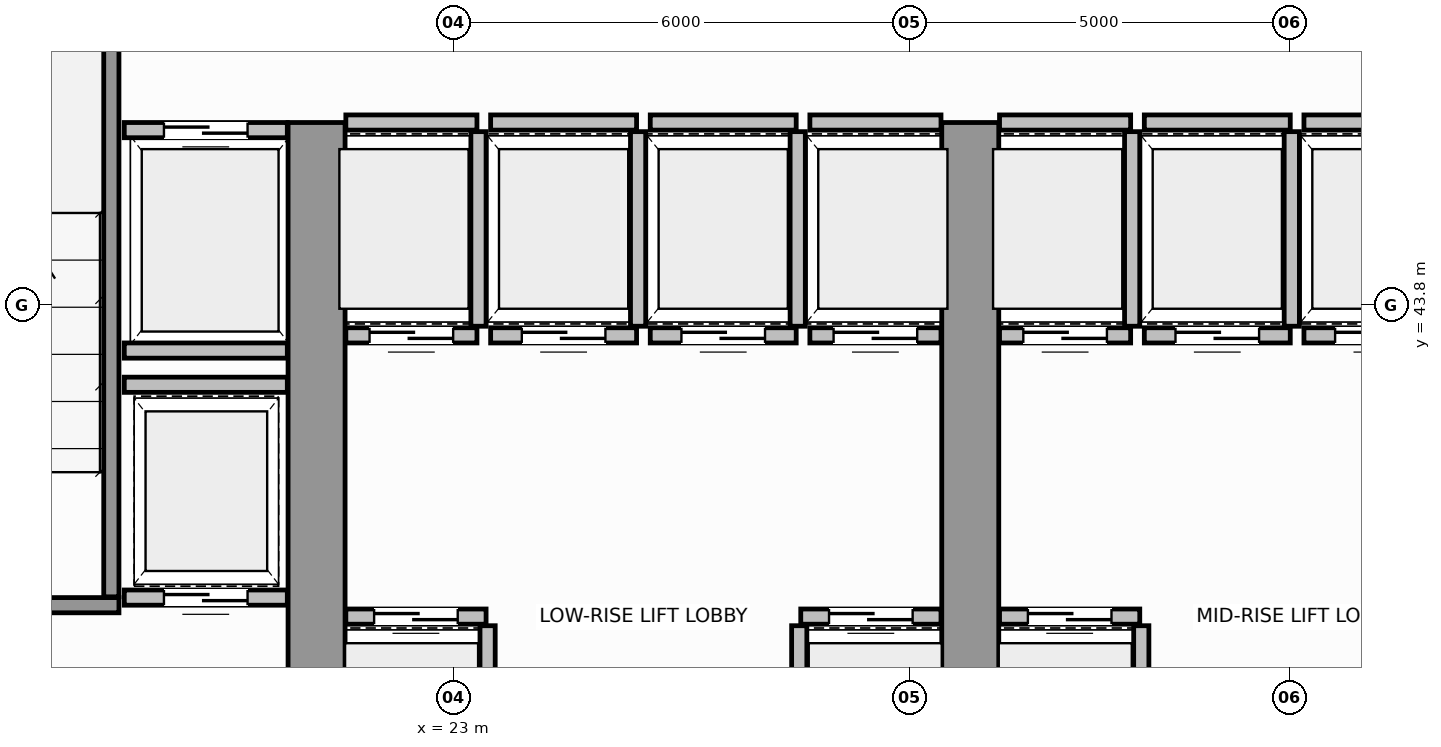
"""IFC4 building model, lengths in metres.
Left out: names, types, materials, properties, quantities, classifications, styles, units other than length and angle.
Written with IfcOpenShell. Run it as: python <this file> out.ifc"""

import sys

from ifc_helpers import new_model, si_unit, direction, frame, frame_2d, origin, place, context, subcontext, project, spatial, rectangle, extrude, source, transform, mapped, element, fill, save


model = new_model("IFC4")
c1 = context("Model", 3, precision=1e-05, world=origin(), true_north=direction((0.0, 1.0)))
c2 = subcontext(c1, "Body", "Model", "MODEL_VIEW")
j1 = project(units=[si_unit("LENGTHUNIT", "METRE"), si_unit("PLANEANGLEUNIT", "RADIAN")], contexts=[c1])
p1 = place(None, origin())
s1 = spatial("IfcSite", under=j1, at=p1, CompositionType="ELEMENT")
p2 = place(p1, origin())
s2 = spatial("IfcBuilding", under=s1, at=p2, CompositionType="ELEMENT")
p3 = place(p2, frame((0.0, 0.0, 99.6)))
s3 = spatial("IfcBuildingStorey", under=s2, at=p3, CompositionType="ELEMENT", Elevation=99.6)
for number, where, z_axis, x_axis in (
    (1, (21.2, 36.895, 0.0), (0.0, 0.0, 1.0), (0.0, 1.0, 0.0)),
    (2, (29.8, 36.895, 0.0), (0.0, 0.0, 1.0), (0.0, 1.0, 0.0)),
):
    element("IfcWall", number, at=place(p3, frame(where, z_axis=z_axis, x_axis=x_axis)), inside=s3, PredefinedType="SHEAR", context=c2, shape_type="SweptSolid", body=[
        extrude(rectangle(XDim=9.305, YDim=0.75, at=frame_2d((4.652, 0.0))), origin(), (0.0, 0.0, 1.0), 3.8),
    ])
p4 = place(p3, frame((14.375, 39.85, 0.0), z_axis=(0.0, 0.0, 1.0), x_axis=(1.0, 0.0, 0.0)))
e3 = element("IfcWall", 3, at=p4, inside=s3, PredefinedType="SOLIDWALL", context=c2, shape_type="SweptSolid", body=[
    extrude(rectangle(XDim=4.225, YDim=0.2, at=frame_2d((2.113, 0.0))), origin(), (0.0, 0.0, 1.0), 3.8),
])
p5 = place(p4, frame((1.8, 0.0, 0.0)))
e4 = element("IfcOpeningElement", 4, at=p5, cuts=e3, PredefinedType="OPENING", context=c2, shape_type="SweptSolid", body=[
    extrude(rectangle(XDim=1.1, YDim=2.15, at=frame_2d((0.55, 1.075))), frame((0.0, 0.11, 0.0), z_axis=(0.0, -1.0, 0.0), x_axis=(1.0, 0.0, 0.0)), (0.0, 0.0, 1.0), 0.22),
])
p6 = place(p3, frame((18.5, 39.96, 0.0), z_axis=(0.0, 0.0, 1.0), x_axis=(0.0, 1.0, 0.0)))
e5 = element("IfcWall", 5, at=p6, inside=s3, PredefinedType="SOLIDWALL", context=c2, shape_type="SweptSolid", body=[
    extrude(rectangle(XDim=9.93, YDim=0.2, at=frame_2d((4.965, 0.0))), origin(), (0.0, 0.0, 1.0), 3.8),
])
p7 = place(p3, frame((21.585, 39.7, 0.0), z_axis=(0.0, 0.0, 1.0), x_axis=(1.0, 0.0, 0.0)))
e6 = element("IfcWall", 6, at=p7, inside=s3, PredefinedType="SOLIDWALL", context=c2, shape_type="SweptSolid", body=[
    extrude(rectangle(XDim=1.845, YDim=0.2, at=frame_2d((0.922, 0.0))), origin(), (0.0, 0.0, 1.0), 3.58),
])
p8 = place(p7, frame((0.372, 0.0, 0.0)))
e7 = element("IfcOpeningElement", 7, at=p8, cuts=e6, PredefinedType="OPENING", context=c2, shape_type="SweptSolid", body=[
    extrude(rectangle(XDim=1.1, YDim=2.15, at=frame_2d((0.55, 1.075))), frame((0.0, 0.11, 0.0), z_axis=(0.0, -1.0, 0.0), x_axis=(1.0, 0.0, 0.0)), (0.0, 0.0, 1.0), 0.22),
])
p9 = place(p3, frame((23.45, 37.02, 0.0), z_axis=(0.0, 0.0, 1.0), x_axis=(0.0, 1.0, 0.0)))
e8 = element("IfcWall", 8, at=p9, inside=s3, PredefinedType="SOLIDWALL", context=c2, shape_type="SweptSolid", body=[
    extrude(rectangle(XDim=2.56, YDim=0.2, at=frame_2d((1.28, 0.0))), origin(), (0.0, 0.0, 1.0), 3.58),
])
p10 = place(p3, frame((27.57, 39.7, 0.0), z_axis=(0.0, 0.0, 1.0), x_axis=(1.0, 0.0, 0.0)))
e9 = element("IfcWall", 9, at=p10, inside=s3, PredefinedType="SOLIDWALL", context=c2, shape_type="SweptSolid", body=[
    extrude(rectangle(XDim=1.845, YDim=0.2, at=frame_2d((0.922, 0.0))), origin(), (0.0, 0.0, 1.0), 3.58),
])
p11 = place(p10, frame((0.372, 0.0, 0.0)))
e10 = element("IfcOpeningElement", 10, at=p11, cuts=e9, PredefinedType="OPENING", context=c2, shape_type="SweptSolid", body=[
    extrude(rectangle(XDim=1.1, YDim=2.15, at=frame_2d((0.55, 1.075))), frame((0.0, 0.11, 0.0), z_axis=(0.0, -1.0, 0.0), x_axis=(1.0, 0.0, 0.0)), (0.0, 0.0, 1.0), 0.22),
])
p12 = place(p3, frame((27.55, 37.02, 0.0), z_axis=(0.0, 0.0, 1.0), x_axis=(0.0, 1.0, 0.0)))
e11 = element("IfcWall", 11, at=p12, inside=s3, PredefinedType="SOLIDWALL", context=c2, shape_type="SweptSolid", body=[
    extrude(rectangle(XDim=2.56, YDim=0.2, at=frame_2d((1.28, 0.0))), origin(), (0.0, 0.0, 1.0), 3.58),
])
p13 = place(p3, frame((21.585, 43.4, 0.0), z_axis=(0.0, 0.0, 1.0), x_axis=(1.0, 0.0, 0.0)))
e12 = element("IfcWall", 12, at=p13, inside=s3, PredefinedType="SOLIDWALL", context=c2, shape_type="SweptSolid", body=[
    extrude(rectangle(XDim=1.725, YDim=0.2, at=frame_2d((0.863, 0.0))), origin(), (0.0, 0.0, 1.0), 3.58),
])
p14 = place(p13, frame((0.312, 0.0, 0.0)))
e13 = element("IfcOpeningElement", 13, at=p14, cuts=e12, PredefinedType="OPENING", context=c2, shape_type="SweptSolid", body=[
    extrude(rectangle(XDim=1.1, YDim=2.15, at=frame_2d((0.55, 1.075))), frame((0.0, 0.11, 0.0), z_axis=(0.0, -1.0, 0.0), x_axis=(1.0, 0.0, 0.0)), (0.0, 0.0, 1.0), 0.22),
])
p15 = place(p3, frame((21.585, 46.2, 0.0), z_axis=(0.0, 0.0, 1.0), x_axis=(1.0, 0.0, 0.0)))
e14 = element("IfcWall", 14, at=p15, inside=s3, PredefinedType="SOLIDWALL", context=c2, shape_type="SweptSolid", body=[
    extrude(rectangle(XDim=1.725, YDim=0.2, at=frame_2d((0.863, 0.0))), origin(), (0.0, 0.0, 1.0), 3.58),
])
p16 = place(p3, frame((23.33, 43.52, 0.0), z_axis=(0.0, 0.0, 1.0), x_axis=(0.0, 1.0, 0.0)))
e15 = element("IfcWall", 15, at=p16, inside=s3, PredefinedType="SOLIDWALL", context=c2, shape_type="SweptSolid", body=[
    extrude(rectangle(XDim=2.56, YDim=0.2, at=frame_2d((1.28, 0.0))), origin(), (0.0, 0.0, 1.0), 3.58),
])
p17 = place(p3, frame((23.49, 43.4, 0.0), z_axis=(0.0, 0.0, 1.0), x_axis=(1.0, 0.0, 0.0)))
e16 = element("IfcWall", 16, at=p17, inside=s3, PredefinedType="SOLIDWALL", context=c2, shape_type="SweptSolid", body=[
    extrude(rectangle(XDim=1.92, YDim=0.2, at=frame_2d((0.96, 0.0))), origin(), (0.0, 0.0, 1.0), 3.58),
])
p18 = place(p17, frame((0.41, 0.0, 0.0)))
e17 = element("IfcOpeningElement", 17, at=p18, cuts=e16, PredefinedType="OPENING", context=c2, shape_type="SweptSolid", body=[
    extrude(rectangle(XDim=1.1, YDim=2.15, at=frame_2d((0.55, 1.075))), frame((0.0, 0.11, 0.0), z_axis=(0.0, -1.0, 0.0), x_axis=(1.0, 0.0, 0.0)), (0.0, 0.0, 1.0), 0.22),
])
p19 = place(p3, frame((23.49, 46.2, 0.0), z_axis=(0.0, 0.0, 1.0), x_axis=(1.0, 0.0, 0.0)))
e18 = element("IfcWall", 18, at=p19, inside=s3, PredefinedType="SOLIDWALL", context=c2, shape_type="SweptSolid", body=[
    extrude(rectangle(XDim=1.92, YDim=0.2, at=frame_2d((0.96, 0.0))), origin(), (0.0, 0.0, 1.0), 3.58),
])
p20 = place(p3, frame((25.43, 43.52, 0.0), z_axis=(0.0, 0.0, 1.0), x_axis=(0.0, 1.0, 0.0)))
e19 = element("IfcWall", 19, at=p20, inside=s3, PredefinedType="SOLIDWALL", context=c2, shape_type="SweptSolid", body=[
    extrude(rectangle(XDim=2.56, YDim=0.2, at=frame_2d((1.28, 0.0))), origin(), (0.0, 0.0, 1.0), 3.58),
])
p21 = place(p3, frame((25.59, 43.4, 0.0), z_axis=(0.0, 0.0, 1.0), x_axis=(1.0, 0.0, 0.0)))
e20 = element("IfcWall", 20, at=p21, inside=s3, PredefinedType="SOLIDWALL", context=c2, shape_type="SweptSolid", body=[
    extrude(rectangle(XDim=1.92, YDim=0.2, at=frame_2d((0.96, 0.0))), origin(), (0.0, 0.0, 1.0), 3.58),
])
p22 = place(p21, frame((0.41, 0.0, 0.0)))
e21 = element("IfcOpeningElement", 21, at=p22, cuts=e20, PredefinedType="OPENING", context=c2, shape_type="SweptSolid", body=[
    extrude(rectangle(XDim=1.1, YDim=2.15, at=frame_2d((0.55, 1.075))), frame((0.0, 0.11, 0.0), z_axis=(0.0, -1.0, 0.0), x_axis=(1.0, 0.0, 0.0)), (0.0, 0.0, 1.0), 0.22),
])
p23 = place(p3, frame((25.59, 46.2, 0.0), z_axis=(0.0, 0.0, 1.0), x_axis=(1.0, 0.0, 0.0)))
e22 = element("IfcWall", 22, at=p23, inside=s3, PredefinedType="SOLIDWALL", context=c2, shape_type="SweptSolid", body=[
    extrude(rectangle(XDim=1.92, YDim=0.2, at=frame_2d((0.96, 0.0))), origin(), (0.0, 0.0, 1.0), 3.58),
])
p24 = place(p3, frame((27.53, 43.52, 0.0), z_axis=(0.0, 0.0, 1.0), x_axis=(0.0, 1.0, 0.0)))
e23 = element("IfcWall", 23, at=p24, inside=s3, PredefinedType="SOLIDWALL", context=c2, shape_type="SweptSolid", body=[
    extrude(rectangle(XDim=2.56, YDim=0.2, at=frame_2d((1.28, 0.0))), origin(), (0.0, 0.0, 1.0), 3.58),
])
p25 = place(p3, frame((27.69, 43.4, 0.0), z_axis=(0.0, 0.0, 1.0), x_axis=(1.0, 0.0, 0.0)))
e24 = element("IfcWall", 24, at=p25, inside=s3, PredefinedType="SOLIDWALL", context=c2, shape_type="SweptSolid", body=[
    extrude(rectangle(XDim=1.725, YDim=0.2, at=frame_2d((0.863, 0.0))), origin(), (0.0, 0.0, 1.0), 3.58),
])
p26 = place(p25, frame((0.312, 0.0, 0.0)))
e25 = element("IfcOpeningElement", 25, at=p26, cuts=e24, PredefinedType="OPENING", context=c2, shape_type="SweptSolid", body=[
    extrude(rectangle(XDim=1.1, YDim=2.15, at=frame_2d((0.55, 1.075))), frame((0.0, 0.11, 0.0), z_axis=(0.0, -1.0, 0.0), x_axis=(1.0, 0.0, 0.0)), (0.0, 0.0, 1.0), 0.22),
])
p27 = place(p3, frame((27.69, 46.2, 0.0), z_axis=(0.0, 0.0, 1.0), x_axis=(1.0, 0.0, 0.0)))
e26 = element("IfcWall", 26, at=p27, inside=s3, PredefinedType="SOLIDWALL", context=c2, shape_type="SweptSolid", body=[
    extrude(rectangle(XDim=1.725, YDim=0.2, at=frame_2d((0.863, 0.0))), origin(), (0.0, 0.0, 1.0), 3.58),
])
p28 = place(p3, frame((30.185, 39.7, 0.0), z_axis=(0.0, 0.0, 1.0), x_axis=(1.0, 0.0, 0.0)))
e27 = element("IfcWall", 27, at=p28, inside=s3, PredefinedType="SOLIDWALL", context=c2, shape_type="SweptSolid", body=[
    extrude(rectangle(XDim=1.845, YDim=0.2, at=frame_2d((0.922, 0.0))), origin(), (0.0, 0.0, 1.0), 3.58),
])
p29 = place(p28, frame((0.373, 0.0, 0.0)))
e28 = element("IfcOpeningElement", 28, at=p29, cuts=e27, PredefinedType="OPENING", context=c2, shape_type="SweptSolid", body=[
    extrude(rectangle(XDim=1.1, YDim=2.15, at=frame_2d((0.55, 1.075))), frame((0.0, 0.11, 0.0), z_axis=(0.0, -1.0, 0.0), x_axis=(1.0, 0.0, 0.0)), (0.0, 0.0, 1.0), 0.22),
])
p30 = place(p3, frame((32.05, 37.02, 0.0), z_axis=(0.0, 0.0, 1.0), x_axis=(0.0, 1.0, 0.0)))
e29 = element("IfcWall", 29, at=p30, inside=s3, PredefinedType="SOLIDWALL", context=c2, shape_type="SweptSolid", body=[
    extrude(rectangle(XDim=2.56, YDim=0.2, at=frame_2d((1.28, 0.0))), origin(), (0.0, 0.0, 1.0), 3.58),
])
p31 = place(p3, frame((30.185, 43.4, 0.0), z_axis=(0.0, 0.0, 1.0), x_axis=(1.0, 0.0, 0.0)))
e30 = element("IfcWall", 30, at=p31, inside=s3, PredefinedType="SOLIDWALL", context=c2, shape_type="SweptSolid", body=[
    extrude(rectangle(XDim=1.725, YDim=0.2, at=frame_2d((0.862, 0.0))), origin(), (0.0, 0.0, 1.0), 3.58),
])
p32 = place(p31, frame((0.313, 0.0, 0.0)))
e31 = element("IfcOpeningElement", 31, at=p32, cuts=e30, PredefinedType="OPENING", context=c2, shape_type="SweptSolid", body=[
    extrude(rectangle(XDim=1.1, YDim=2.15, at=frame_2d((0.55, 1.075))), frame((0.0, 0.11, 0.0), z_axis=(0.0, -1.0, 0.0), x_axis=(1.0, 0.0, 0.0)), (0.0, 0.0, 1.0), 0.22),
])
p33 = place(p3, frame((30.185, 46.2, 0.0), z_axis=(0.0, 0.0, 1.0), x_axis=(1.0, 0.0, 0.0)))
e32 = element("IfcWall", 32, at=p33, inside=s3, PredefinedType="SOLIDWALL", context=c2, shape_type="SweptSolid", body=[
    extrude(rectangle(XDim=1.725, YDim=0.2, at=frame_2d((0.862, 0.0))), origin(), (0.0, 0.0, 1.0), 3.58),
])
p34 = place(p3, frame((31.93, 43.52, 0.0), z_axis=(0.0, 0.0, 1.0), x_axis=(0.0, 1.0, 0.0)))
e33 = element("IfcWall", 33, at=p34, inside=s3, PredefinedType="SOLIDWALL", context=c2, shape_type="SweptSolid", body=[
    extrude(rectangle(XDim=2.56, YDim=0.2, at=frame_2d((1.28, 0.0))), origin(), (0.0, 0.0, 1.0), 3.58),
])
p35 = place(p3, frame((32.09, 43.4, 0.0), z_axis=(0.0, 0.0, 1.0), x_axis=(1.0, 0.0, 0.0)))
e34 = element("IfcWall", 34, at=p35, inside=s3, PredefinedType="SOLIDWALL", context=c2, shape_type="SweptSolid", body=[
    extrude(rectangle(XDim=1.92, YDim=0.2, at=frame_2d((0.96, 0.0))), origin(), (0.0, 0.0, 1.0), 3.58),
])
p36 = place(p35, frame((0.41, 0.0, 0.0)))
e35 = element("IfcOpeningElement", 35, at=p36, cuts=e34, PredefinedType="OPENING", context=c2, shape_type="SweptSolid", body=[
    extrude(rectangle(XDim=1.1, YDim=2.15, at=frame_2d((0.55, 1.075))), frame((0.0, 0.11, 0.0), z_axis=(0.0, -1.0, 0.0), x_axis=(1.0, 0.0, 0.0)), (0.0, 0.0, 1.0), 0.22),
])
p37 = place(p3, frame((32.09, 46.2, 0.0), z_axis=(0.0, 0.0, 1.0), x_axis=(1.0, 0.0, 0.0)))
e36 = element("IfcWall", 36, at=p37, inside=s3, PredefinedType="SOLIDWALL", context=c2, shape_type="SweptSolid", body=[
    extrude(rectangle(XDim=1.92, YDim=0.2, at=frame_2d((0.96, 0.0))), origin(), (0.0, 0.0, 1.0), 3.58),
])
p38 = place(p3, frame((34.03, 43.52, 0.0), z_axis=(0.0, 0.0, 1.0), x_axis=(0.0, 1.0, 0.0)))
e37 = element("IfcWall", 37, at=p38, inside=s3, PredefinedType="SOLIDWALL", context=c2, shape_type="SweptSolid", body=[
    extrude(rectangle(XDim=2.56, YDim=0.2, at=frame_2d((1.28, 0.0))), origin(), (0.0, 0.0, 1.0), 3.58),
])
p39 = place(p3, frame((34.19, 43.4, 0.0), z_axis=(0.0, 0.0, 1.0), x_axis=(1.0, 0.0, 0.0)))
e38 = element("IfcWall", 38, at=p39, inside=s3, PredefinedType="SOLIDWALL", context=c2, shape_type="SweptSolid", body=[
    extrude(rectangle(XDim=1.92, YDim=0.2, at=frame_2d((0.96, 0.0))), origin(), (0.0, 0.0, 1.0), 3.58),
])
p40 = place(p39, frame((0.41, 0.0, 0.0)))
e39 = element("IfcOpeningElement", 39, at=p40, cuts=e38, PredefinedType="OPENING", context=c2, shape_type="SweptSolid", body=[
    extrude(rectangle(XDim=1.1, YDim=2.15, at=frame_2d((0.55, 1.075))), frame((0.0, 0.11, 0.0), z_axis=(0.0, -1.0, 0.0), x_axis=(1.0, 0.0, 0.0)), (0.0, 0.0, 1.0), 0.22),
])
p41 = place(p3, frame((34.19, 46.2, 0.0), z_axis=(0.0, 0.0, 1.0), x_axis=(1.0, 0.0, 0.0)))
e40 = element("IfcWall", 40, at=p41, inside=s3, PredefinedType="SOLIDWALL", context=c2, shape_type="SweptSolid", body=[
    extrude(rectangle(XDim=1.92, YDim=0.2, at=frame_2d((0.96, 0.0))), origin(), (0.0, 0.0, 1.0), 3.58),
])
p42 = place(p3, frame((18.67, 46.1, 0.0), z_axis=(0.0, 0.0, 1.0), x_axis=(1.0, 0.0, 0.0)))
e41 = element("IfcWall", 41, at=p42, inside=s3, PredefinedType="SOLIDWALL", context=c2, shape_type="SweptSolid", body=[
    extrude(rectangle(XDim=2.145, YDim=0.2, at=frame_2d((1.073, 0.0))), origin(), (0.0, 0.0, 1.0), 3.58),
])
p43 = place(p42, frame((0.522, 0.0, 0.0)))
e42 = element("IfcOpeningElement", 42, at=p43, cuts=e41, PredefinedType="OPENING", context=c2, shape_type="SweptSolid", body=[
    extrude(rectangle(XDim=1.1, YDim=2.15, at=frame_2d((0.55, 1.075))), frame((0.0, 0.11, 0.0), z_axis=(0.0, -1.0, 0.0), x_axis=(1.0, 0.0, 0.0)), (0.0, 0.0, 1.0), 0.22),
])
p44 = place(p3, frame((18.67, 43.2, 0.0), z_axis=(0.0, 0.0, 1.0), x_axis=(1.0, 0.0, 0.0)))
e43 = element("IfcWall", 43, at=p44, inside=s3, PredefinedType="SOLIDWALL", context=c2, shape_type="SweptSolid", body=[
    extrude(rectangle(XDim=2.145, YDim=0.2, at=frame_2d((1.073, 0.0))), origin(), (0.0, 0.0, 1.0), 3.58),
])
p45 = place(p3, frame((18.67, 39.95, 0.0), z_axis=(0.0, 0.0, 1.0), x_axis=(1.0, 0.0, 0.0)))
e44 = element("IfcWall", 44, at=p45, inside=s3, PredefinedType="SOLIDWALL", context=c2, shape_type="SweptSolid", body=[
    extrude(rectangle(XDim=2.145, YDim=0.2, at=frame_2d((1.073, 0.0))), origin(), (0.0, 0.0, 1.0), 3.58),
])
p46 = place(p45, frame((0.522, 0.0, 0.0)))
e45 = element("IfcOpeningElement", 45, at=p46, cuts=e44, PredefinedType="OPENING", context=c2, shape_type="SweptSolid", body=[
    extrude(rectangle(XDim=1.1, YDim=2.15, at=frame_2d((0.55, 1.075))), frame((0.0, 0.11, 0.0), z_axis=(0.0, -1.0, 0.0), x_axis=(1.0, 0.0, 0.0)), (0.0, 0.0, 1.0), 0.22),
])
p47 = place(p3, frame((18.67, 42.75, 0.0), z_axis=(0.0, 0.0, 1.0), x_axis=(1.0, 0.0, 0.0)))
e46 = element("IfcWall", 46, at=p47, inside=s3, PredefinedType="SOLIDWALL", context=c2, shape_type="SweptSolid", body=[
    extrude(rectangle(XDim=2.145, YDim=0.2, at=frame_2d((1.073, 0.0))), origin(), (0.0, 0.0, 1.0), 3.58),
])
m1 = source(origin(), c2, "Body", "SweptSolid", [
    extrude(rectangle(XDim=1.1, YDim=2.15, at=frame_2d((0.55, 1.075))), frame((0.0, 0.025, 0.0), z_axis=(0.0, -1.0, 0.0), x_axis=(1.0, 0.0, 0.0)), (0.0, 0.0, 1.0), 0.05),
])
p48 = place(p8, origin())
e47 = element("IfcDoor", 47, at=p48, inside=s3, OperationType="DOUBLE_DOOR_SLIDING", PredefinedType="DOOR", context=c2, shape_type="MappedRepresentation", body=[
    mapped(m1, transform((0.0, 0.0, 0.0), scale=1.0)),
])
fill(e7, e47)
p49 = place(p11, origin())
e48 = element("IfcDoor", 48, at=p49, inside=s3, OperationType="DOUBLE_DOOR_SLIDING", PredefinedType="DOOR", context=c2, shape_type="MappedRepresentation", body=[
    mapped(m1, transform((0.0, 0.0, 0.0), scale=1.0)),
])
fill(e10, e48)
p50 = place(p14, origin())
e49 = element("IfcDoor", 49, at=p50, inside=s3, OperationType="DOUBLE_DOOR_SLIDING", PredefinedType="DOOR", context=c2, shape_type="MappedRepresentation", body=[
    mapped(m1, transform((0.0, 0.0, 0.0), scale=1.0)),
])
fill(e13, e49)
p51 = place(p18, origin())
e50 = element("IfcDoor", 50, at=p51, inside=s3, OperationType="DOUBLE_DOOR_SLIDING", PredefinedType="DOOR", context=c2, shape_type="MappedRepresentation", body=[
    mapped(m1, transform((0.0, 0.0, 0.0), scale=1.0)),
])
fill(e17, e50)
p52 = place(p22, origin())
e51 = element("IfcDoor", 51, at=p52, inside=s3, OperationType="DOUBLE_DOOR_SLIDING", PredefinedType="DOOR", context=c2, shape_type="MappedRepresentation", body=[
    mapped(m1, transform((0.0, 0.0, 0.0), scale=1.0)),
])
fill(e21, e51)
p53 = place(p26, origin())
e52 = element("IfcDoor", 52, at=p53, inside=s3, OperationType="DOUBLE_DOOR_SLIDING", PredefinedType="DOOR", context=c2, shape_type="MappedRepresentation", body=[
    mapped(m1, transform((0.0, 0.0, 0.0), scale=1.0)),
])
fill(e25, e52)
p54 = place(p29, origin())
e53 = element("IfcDoor", 53, at=p54, inside=s3, OperationType="DOUBLE_DOOR_SLIDING", PredefinedType="DOOR", context=c2, shape_type="MappedRepresentation", body=[
    mapped(m1, transform((0.0, 0.0, 0.0), scale=1.0)),
])
fill(e28, e53)
p55 = place(p32, origin())
e54 = element("IfcDoor", 54, at=p55, inside=s3, OperationType="DOUBLE_DOOR_SLIDING", PredefinedType="DOOR", context=c2, shape_type="MappedRepresentation", body=[
    mapped(m1, transform((0.0, 0.0, 0.0), scale=1.0)),
])
fill(e31, e54)
p56 = place(p36, origin())
e55 = element("IfcDoor", 55, at=p56, inside=s3, OperationType="DOUBLE_DOOR_SLIDING", PredefinedType="DOOR", context=c2, shape_type="MappedRepresentation", body=[
    mapped(m1, transform((0.0, 0.0, 0.0), scale=1.0)),
])
fill(e35, e55)
p57 = place(p40, origin())
e56 = element("IfcDoor", 56, at=p57, inside=s3, OperationType="DOUBLE_DOOR_SLIDING", PredefinedType="DOOR", context=c2, shape_type="MappedRepresentation", body=[
    mapped(m1, transform((0.0, 0.0, 0.0), scale=1.0)),
])
fill(e39, e56)
p58 = place(p43, origin())
e57 = element("IfcDoor", 57, at=p58, inside=s3, OperationType="DOUBLE_DOOR_SLIDING", PredefinedType="DOOR", context=c2, shape_type="MappedRepresentation", body=[
    mapped(m1, transform((0.0, 0.0, 0.0), scale=1.0)),
])
fill(e42, e57)
p59 = place(p46, origin())
e58 = element("IfcDoor", 58, at=p59, inside=s3, OperationType="DOUBLE_DOOR_SLIDING", PredefinedType="DOOR", context=c2, shape_type="MappedRepresentation", body=[
    mapped(m1, transform((0.0, 0.0, 0.0), scale=1.0)),
])
fill(e45, e58)
save(model, sys.argv[1])
